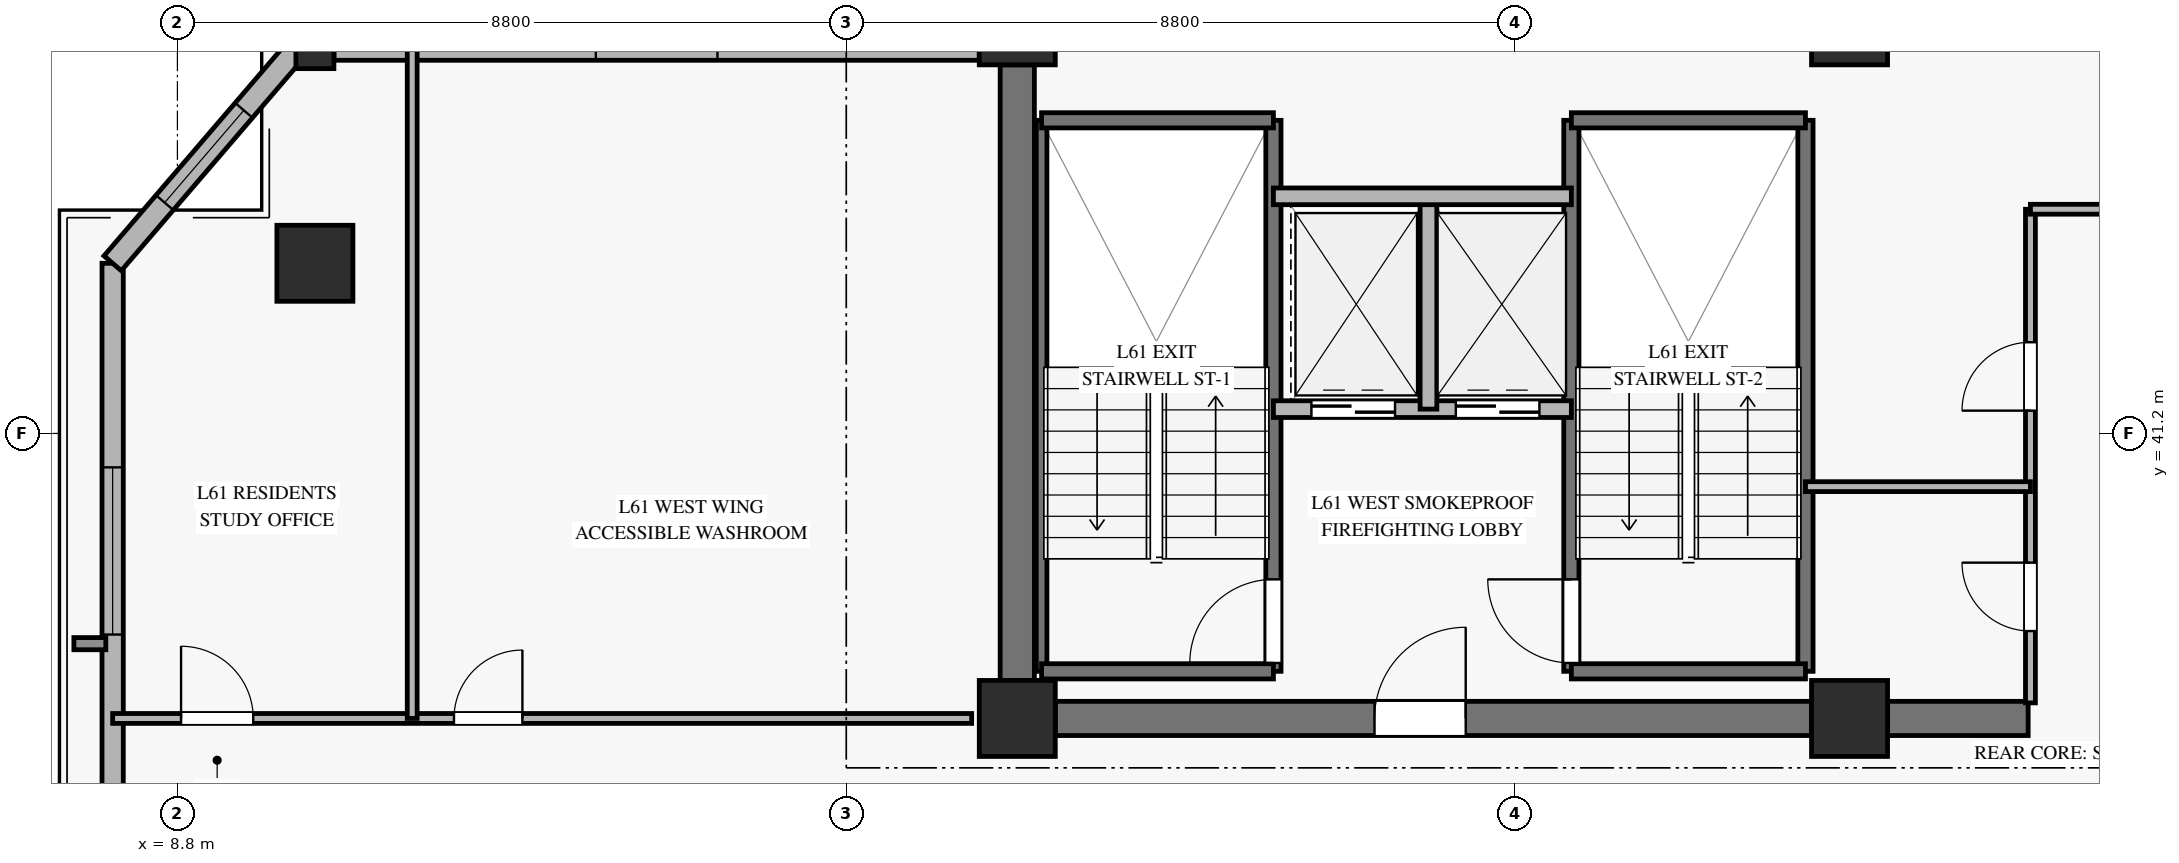
"""IFC4 building model, lengths in metres.
Left out: names, types, materials, properties, quantities, classifications, styles, units other than length and angle.
Written with IfcOpenShell. Run it as: python <this file> out.ifc"""

import sys

from ifc_helpers import new_model, si_unit, direction, frame, frame_2d, origin, origin_2d, place, context, subcontext, project, spatial, rectangle, hollow_rectangle, extrude, source, transform, mapped, element, fill, save


model = new_model("IFC4")
c1 = context("Model", 3, precision=1e-05, world=origin(), true_north=direction((0.0, 1.0)))
c2 = subcontext(c1, "Body", "Model", "MODEL_VIEW")
j1 = project(units=[si_unit("LENGTHUNIT", "METRE"), si_unit("PLANEANGLEUNIT", "RADIAN")], contexts=[c1])
p1 = place(None, origin())
s1 = spatial("IfcSite", under=j1, at=p1, CompositionType="ELEMENT")
p2 = place(p1, origin())
s2 = spatial("IfcBuilding", under=s1, at=p2, CompositionType="ELEMENT")
p3 = place(p2, frame((0.0, 0.0, 241.7)))
s3 = spatial("IfcBuildingStorey", under=s2, at=p3, CompositionType="ELEMENT", Elevation=241.7)
m1 = source(origin(), c2, "Body", "SweptSolid", [
    extrude(rectangle(XDim=1.0, YDim=1.0, at=origin_2d()), origin(), (0.0, 0.0, 1.0), 3.185),
])
for number, where, z_axis, x_axis in (
    (1, (19.85, 37.45, 0.0), (0.0, 0.0, 1.0), (1.0, 0.0, 0.0)),
    (2, (19.85, 46.55, 0.0), (0.0, 0.0, 1.0), (1.0, 0.0, 0.0)),
    (3, (30.8, 37.45, 0.0), (0.0, 0.0, 1.0), (1.0, 0.0, 0.0)),
    (4, (30.8, 46.55, 0.0), (0.0, 0.0, 1.0), (1.0, 0.0, 0.0)),
):
    element("IfcColumn", number, at=place(p3, frame(where, z_axis=z_axis, x_axis=x_axis)), inside=s3, PredefinedType="PILASTER", context=c2, shape_type="MappedRepresentation", body=[
        mapped(m1, transform((0.0, 0.0, 0.0), x_axis=(1.0, 0.0, 0.0), y_axis=(0.0, 1.0, 0.0), z_axis=(0.0, 0.0, 1.0), scale=1.0)),
    ])
p4 = place(p3, frame((20.35, 37.45, 0.0), z_axis=(0.0, 0.0, 1.0), x_axis=(1.0, 0.0, 0.0)))
e5 = element("IfcWall", 5, at=p4, inside=s3, PredefinedType="SHEAR", context=c2, shape_type="SweptSolid", body=[
    extrude(rectangle(XDim=9.95, YDim=0.45, at=frame_2d((4.975, 0.0))), origin(), (0.0, 0.0, 1.0), 3.185),
])
p5 = place(p4, frame((4.2, 0.0, 0.0)))
e6 = element("IfcOpeningElement", 6, at=p5, cuts=e5, PredefinedType="OPENING", context=c2, shape_type="SweptSolid", body=[
    extrude(rectangle(XDim=1.2, YDim=2.15, at=frame_2d((0.6, 1.075))), frame((0.0, 0.235, 0.0), z_axis=(0.0, -1.0, 0.0), x_axis=(1.0, 0.0, 0.0)), (0.0, 0.0, 1.0), 0.47),
])
p6 = place(p3, frame((31.3, 37.45, 0.0), z_axis=(0.0, 0.0, 1.0), x_axis=(1.0, 0.0, 0.0)))
e7 = element("IfcWall", 7, at=p6, inside=s3, PredefinedType="SHEAR", context=c2, shape_type="SweptSolid", body=[
    extrude(rectangle(XDim=1.85, YDim=0.45, at=frame_2d((0.925, 0.0))), origin(), (0.0, 0.0, 1.0), 3.185),
])
p7 = place(p3, frame((19.85, 37.95, 0.0), z_axis=(0.0, 0.0, 1.0), x_axis=(0.0, 1.0, 0.0)))
e8 = element("IfcWall", 8, at=p7, inside=s3, PredefinedType="SHEAR", context=c2, shape_type="SweptSolid", body=[
    extrude(rectangle(XDim=8.1, YDim=0.45, at=frame_2d((4.05, 0.0))), origin(), (0.0, 0.0, 1.0), 3.185),
])
m2 = source(origin(), c2, "Body", "SweptSolid", [
    extrude(hollow_rectangle(XDim=1.0, YDim=1.0, WallThickness=0.045, at=origin_2d()), origin(), (0.0, 0.0, 1.0), 3.185),
])
p8 = place(p3, frame((10.609, 43.439, 0.0), z_axis=(0.0, 0.0, 1.0), x_axis=(1.0, 0.0, 0.0)))
e9 = element("IfcColumn", 9, at=p8, inside=s3, PredefinedType="COLUMN", context=c2, shape_type="MappedRepresentation", body=[
    mapped(m2, transform((0.0, 0.0, 0.0), x_axis=(1.0, 0.0, 0.0), y_axis=(0.0, 1.0, 0.0), z_axis=(0.0, 0.0, 1.0), scale=1.0)),
])
m3 = source(origin(), c2, "Body", "SweptSolid", [
    extrude(hollow_rectangle(XDim=0.5, YDim=0.5, WallThickness=0.024, at=origin_2d()), origin(), (0.0, 0.0, 1.0), 3.185),
])
p9 = place(p3, frame((10.609, 46.25, 0.0), z_axis=(0.0, 0.0, 1.0), x_axis=(1.0, 0.0, 0.0)))
e10 = element("IfcColumn", 10, at=p9, inside=s3, PredefinedType="COLUMN", context=c2, shape_type="MappedRepresentation", body=[
    mapped(m3, transform((0.0, 0.0, 0.0), x_axis=(1.0, 0.0, 0.0), y_axis=(0.0, 1.0, 0.0), z_axis=(0.0, 0.0, 1.0), scale=1.0)),
])
p10 = place(p3, frame((7.948, 30.391, 0.0), z_axis=(0.0, 0.0, 1.0), x_axis=(0.0, 1.0, 0.0)))
e11 = element("IfcWall", 11, at=p10, inside=s3, PredefinedType="SOLIDWALL", context=c2, shape_type="SweptSolid", body=[
    extrude(rectangle(XDim=13.048, YDim=0.28, at=frame_2d((6.524, 0.0))), origin(), (0.0, 0.0, 1.0), 2.815),
])
p11 = place(p10, frame((8.163, 0.0, 0.45)))
e12 = element("IfcOpeningElement", 12, at=p11, cuts=e11, PredefinedType="OPENING", context=c2, shape_type="SweptSolid", body=[
    extrude(rectangle(XDim=2.2, YDim=2.1, at=frame_2d((1.1, 1.05))), frame((0.0, 0.15, 0.0), z_axis=(0.0, -1.0, 0.0), x_axis=(1.0, 0.0, 0.0)), (0.0, 0.0, 1.0), 0.3),
])
p12 = place(p3, frame((10.859, 46.25, 0.0), z_axis=(0.0, 0.0, 1.0), x_axis=(1.0, 0.0, 0.0)))
e13 = element("IfcWall", 13, at=p12, inside=s3, PredefinedType="SOLIDWALL", context=c2, shape_type="SweptSolid", body=[
    extrude(rectangle(XDim=8.491, YDim=0.28, at=frame_2d((4.246, 0.0))), origin(), (0.0, 0.0, 1.0), 2.815),
])
p13 = place(p12, frame((3.446, 0.0, 0.45)))
e14 = element("IfcOpeningElement", 14, at=p13, cuts=e13, PredefinedType="OPENING", context=c2, shape_type="SweptSolid", body=[
    extrude(rectangle(XDim=1.6, YDim=2.0, at=frame_2d((0.8, 1.0))), frame((0.0, 0.15, 0.0), z_axis=(0.0, -1.0, 0.0), x_axis=(1.0, 0.0, 0.0)), (0.0, 0.0, 1.0), 0.3),
])
p14 = place(p3, frame((10.359, 46.25, 0.0), z_axis=(0.0, 0.0, 1.0), x_axis=(-0.651013940872, -0.759065773692, 0.0)))
e15 = element("IfcWall", 15, at=p14, inside=s3, PredefinedType="SOLIDWALL", context=c2, shape_type="SweptSolid", body=[
    extrude(rectangle(XDim=3.703, YDim=0.3, at=frame_2d((1.852, 0.0))), origin(), (0.0, 0.0, 1.0), 2.815),
])
p15 = place(p14, frame((1.052, 0.0, 0.45)))
e16 = element("IfcOpeningElement", 16, at=p15, cuts=e15, PredefinedType="OPENING", context=c2, shape_type="SweptSolid", body=[
    extrude(rectangle(XDim=1.6, YDim=2.0, at=frame_2d((0.8, 1.0))), frame((0.0, 0.16, 0.0), z_axis=(0.0, -1.0, 0.0), x_axis=(1.0, 0.0, 0.0)), (0.0, 0.0, 1.0), 0.32),
])
p16 = place(p3, frame((20.17, 38.07, 0.0), z_axis=(0.0, 0.0, 1.0), x_axis=(0.0, 1.0, 0.0)))
e17 = element("IfcWall", 17, at=p16, inside=s3, PredefinedType="SOLIDWALL", context=c2, shape_type="SweptSolid", body=[
    extrude(rectangle(XDim=7.25, YDim=0.14, at=frame_2d((3.625, 0.0))), origin(), (0.0, 0.0, 1.0), 3.4),
])
p17 = place(p3, frame((23.22, 38.07, 0.0), z_axis=(0.0, 0.0, 1.0), x_axis=(0.0, 1.0, 0.0)))
e18 = element("IfcWall", 18, at=p17, inside=s3, PredefinedType="SOLIDWALL", context=c2, shape_type="SweptSolid", body=[
    extrude(rectangle(XDim=7.25, YDim=0.2, at=frame_2d((3.625, 0.0))), origin(), (0.0, 0.0, 1.0), 3.4),
])
p18 = place(p17, frame((0.11, 0.0, 0.0)))
e19 = element("IfcOpeningElement", 19, at=p18, cuts=e18, PredefinedType="OPENING", context=c2, shape_type="SweptSolid", body=[
    extrude(rectangle(XDim=1.1, YDim=2.15, at=frame_2d((0.55, 1.075))), frame((0.0, 0.11, 0.0), z_axis=(0.0, -1.0, 0.0), x_axis=(1.0, 0.0, 0.0)), (0.0, 0.0, 1.0), 0.22),
])
for number, where, z_axis, x_axis in (
    (20, (20.17, 45.32, 0.0), (0.0, 0.0, 1.0), (1.0, 0.0, 0.0)),
    (21, (20.17, 38.07, 0.0), (0.0, 0.0, 1.0), (1.0, 0.0, 0.0)),
):
    element("IfcWall", number, at=place(p3, frame(where, z_axis=z_axis, x_axis=x_axis)), inside=s3, PredefinedType="SOLIDWALL", context=c2, shape_type="SweptSolid", body=[
        extrude(rectangle(XDim=3.05, YDim=0.2, at=frame_2d((1.525, 0.0))), origin(), (0.0, 0.0, 1.0), 3.4),
    ])
p19 = place(p3, frame((27.14, 38.07, 0.0), z_axis=(0.0, 0.0, 1.0), x_axis=(0.0, 1.0, 0.0)))
e22 = element("IfcWall", 22, at=p19, inside=s3, PredefinedType="SOLIDWALL", context=c2, shape_type="SweptSolid", body=[
    extrude(rectangle(XDim=7.25, YDim=0.2, at=frame_2d((3.625, 0.0))), origin(), (0.0, 0.0, 1.0), 3.4),
])
p20 = place(p19, frame((0.11, 0.0, 0.0)))
e23 = element("IfcOpeningElement", 23, at=p20, cuts=e22, PredefinedType="OPENING", context=c2, shape_type="SweptSolid", body=[
    extrude(rectangle(XDim=1.1, YDim=2.15, at=frame_2d((0.55, 1.075))), frame((0.0, 0.11, 0.0), z_axis=(0.0, -1.0, 0.0), x_axis=(1.0, 0.0, 0.0)), (0.0, 0.0, 1.0), 0.22),
])
p21 = place(p3, frame((30.22, 38.07, 0.0), z_axis=(0.0, 0.0, 1.0), x_axis=(0.0, 1.0, 0.0)))
e24 = element("IfcWall", 24, at=p21, inside=s3, PredefinedType="SOLIDWALL", context=c2, shape_type="SweptSolid", body=[
    extrude(rectangle(XDim=7.25, YDim=0.2, at=frame_2d((3.625, 0.0))), origin(), (0.0, 0.0, 1.0), 3.4),
])
for number, where, z_axis, x_axis in (
    (25, (27.14, 45.32, 0.0), (0.0, 0.0, 1.0), (1.0, 0.0, 0.0)),
    (26, (27.14, 38.07, 0.0), (0.0, 0.0, 1.0), (1.0, 0.0, 0.0)),
):
    element("IfcWall", number, at=place(p3, frame(where, z_axis=z_axis, x_axis=x_axis)), inside=s3, PredefinedType="SOLIDWALL", context=c2, shape_type="SweptSolid", body=[
        extrude(rectangle(XDim=3.08, YDim=0.2, at=frame_2d((1.54, 0.0))), origin(), (0.0, 0.0, 1.0), 3.4),
    ])
p22 = place(p3, frame((23.22, 41.52, 0.0), z_axis=(0.0, 0.0, 1.0), x_axis=(1.0, 0.0, 0.0)))
e27 = element("IfcWall", 27, at=p22, inside=s3, PredefinedType="SOLIDWALL", context=c2, shape_type="SweptSolid", body=[
    extrude(rectangle(XDim=3.92, YDim=0.22, at=frame_2d((1.96, 0.0))), origin(), (0.0, 0.0, 1.0), 3.185),
])
p23 = place(p22, frame((0.5, 0.0, 0.0)))
e28 = element("IfcOpeningElement", 28, at=p23, cuts=e27, PredefinedType="OPENING", context=c2, shape_type="SweptSolid", body=[
    extrude(rectangle(XDim=1.1, YDim=2.2, at=frame_2d((0.55, 1.1))), frame((0.0, 0.12, 0.0), z_axis=(0.0, -1.0, 0.0), x_axis=(1.0, 0.0, 0.0)), (0.0, 0.0, 1.0), 0.24),
])
p24 = place(p22, frame((2.4, 0.0, 0.0)))
e29 = element("IfcOpeningElement", 29, at=p24, cuts=e27, PredefinedType="OPENING", context=c2, shape_type="SweptSolid", body=[
    extrude(rectangle(XDim=1.1, YDim=2.2, at=frame_2d((0.55, 1.1))), frame((0.0, 0.12, 0.0), z_axis=(0.0, -1.0, 0.0), x_axis=(1.0, 0.0, 0.0)), (0.0, 0.0, 1.0), 0.24),
])
p25 = place(p3, frame((25.26, 41.52, 0.0), z_axis=(0.0, 0.0, 1.0), x_axis=(0.0, 1.0, 0.0)))
e30 = element("IfcWall", 30, at=p25, inside=s3, PredefinedType="SOLIDWALL", context=c2, shape_type="SweptSolid", body=[
    extrude(rectangle(XDim=2.8, YDim=0.22, at=frame_2d((1.4, 0.0))), origin(), (0.0, 0.0, 1.0), 3.185),
])
p26 = place(p3, frame((23.22, 44.32, 0.0), z_axis=(0.0, 0.0, 1.0), x_axis=(1.0, 0.0, 0.0)))
e31 = element("IfcWall", 31, at=p26, inside=s3, PredefinedType="SOLIDWALL", context=c2, shape_type="SweptSolid", body=[
    extrude(rectangle(XDim=3.92, YDim=0.22, at=frame_2d((1.96, 0.0))), origin(), (0.0, 0.0, 1.0), 3.185),
])
p27 = place(p3, frame((33.18, 37.655, 0.0), z_axis=(0.0, 0.0, 1.0), x_axis=(0.0, 1.0, 0.0)))
e32 = element("IfcWall", 32, at=p27, inside=s3, PredefinedType="PARTITIONING", context=c2, shape_type="SweptSolid", body=[
    extrude(rectangle(XDim=6.495, YDim=0.13, at=frame_2d((3.248, 0.0))), origin(), (0.0, 0.0, 1.0), 2.27),
])
p28 = place(p27, frame((0.945, 0.0, 0.0)))
e33 = element("IfcOpeningElement", 33, at=p28, cuts=e32, PredefinedType="OPENING", context=c2, shape_type="SweptSolid", body=[
    extrude(rectangle(XDim=0.9, YDim=2.1, at=frame_2d((0.45, 1.05))), frame((0.0, 0.075, 0.0), z_axis=(0.0, -1.0, 0.0), x_axis=(1.0, 0.0, 0.0)), (0.0, 0.0, 1.0), 0.15),
])
p29 = place(p27, frame((3.845, 0.0, 0.0)))
e34 = element("IfcOpeningElement", 34, at=p29, cuts=e32, PredefinedType="OPENING", context=c2, shape_type="SweptSolid", body=[
    extrude(rectangle(XDim=0.9, YDim=2.1, at=frame_2d((0.45, 1.05))), frame((0.0, 0.075, 0.0), z_axis=(0.0, -1.0, 0.0), x_axis=(1.0, 0.0, 0.0)), (0.0, 0.0, 1.0), 0.15),
])
p30 = place(p3, frame((33.18, 44.15, 0.0), z_axis=(0.0, 0.0, 1.0), x_axis=(1.0, 0.0, 0.0)))
e35 = element("IfcWall", 35, at=p30, inside=s3, PredefinedType="PARTITIONING", context=c2, shape_type="SweptSolid", body=[
    extrude(rectangle(XDim=2.94, YDim=0.13, at=frame_2d((1.47, 0.0))), origin(), (0.0, 0.0, 1.0), 2.47),
])
p31 = place(p3, frame((30.22, 40.5, 0.0), z_axis=(0.0, 0.0, 1.0), x_axis=(1.0, 0.0, 0.0)))
e36 = element("IfcWall", 36, at=p31, inside=s3, PredefinedType="PARTITIONING", context=c2, shape_type="SweptSolid", body=[
    extrude(rectangle(XDim=2.96, YDim=0.13, at=frame_2d((1.48, 0.0))), origin(), (0.0, 0.0, 1.0), 2.47),
])
p32 = place(p3, frame((7.948, 37.45, 0.0), z_axis=(0.0, 0.0, 1.0), x_axis=(1.0, 0.0, 0.0)))
e37 = element("IfcWall", 37, at=p32, inside=s3, PredefinedType="PARTITIONING", context=c2, shape_type="SweptSolid", body=[
    extrude(rectangle(XDim=11.302, YDim=0.13, at=frame_2d((5.651, 0.0))), origin(), (0.0, 0.0, 1.0), 2.82),
])
p33 = place(p32, frame((0.9, 0.0, 0.0)))
e38 = element("IfcOpeningElement", 38, at=p33, cuts=e37, PredefinedType="OPENING", context=c2, shape_type="SweptSolid", body=[
    extrude(rectangle(XDim=0.95, YDim=2.1, at=frame_2d((0.475, 1.05))), frame((0.0, 0.075, 0.0), z_axis=(0.0, -1.0, 0.0), x_axis=(1.0, 0.0, 0.0)), (0.0, 0.0, 1.0), 0.15),
])
p34 = place(p32, frame((4.491, 0.0, 0.0)))
e39 = element("IfcOpeningElement", 39, at=p34, cuts=e37, PredefinedType="OPENING", context=c2, shape_type="SweptSolid", body=[
    extrude(rectangle(XDim=0.9, YDim=2.1, at=frame_2d((0.45, 1.05))), frame((0.0, 0.075, 0.0), z_axis=(0.0, -1.0, 0.0), x_axis=(1.0, 0.0, 0.0)), (0.0, 0.0, 1.0), 0.15),
])
p35 = place(p3, frame((11.889, 37.45, 0.0), z_axis=(0.0, 0.0, 1.0), x_axis=(0.0, 1.0, 0.0)))
e40 = element("IfcWall", 40, at=p35, inside=s3, PredefinedType="PARTITIONING", context=c2, shape_type="SweptSolid", body=[
    extrude(rectangle(XDim=8.8, YDim=0.13, at=frame_2d((4.4, 0.0))), origin(), (0.0, 0.0, 1.0), 3.185),
])
m4 = source(origin(), c2, "Body", "SweptSolid", [
    extrude(rectangle(XDim=2.2, YDim=2.1, at=frame_2d((1.1, 1.05))), frame((0.0, 0.03, 0.0), z_axis=(0.0, -1.0, 0.0), x_axis=(1.0, 0.0, 0.0)), (0.0, 0.0, 1.0), 0.06),
])
p36 = place(p11, origin())
e41 = element("IfcWindow", 41, at=p36, inside=s3, PartitioningType="SINGLE_PANEL", PredefinedType="WINDOW", context=c2, shape_type="MappedRepresentation", body=[
    mapped(m4, transform((0.0, 0.0, 0.0), x_axis=(1.0, 0.0, 0.0), y_axis=(0.0, 1.0, 0.0), z_axis=(0.0, 0.0, 1.0), scale=1.0)),
])
fill(e12, e41)
m5 = source(origin(), c2, "Body", "SweptSolid", [
    extrude(rectangle(XDim=1.6, YDim=2.0, at=frame_2d((0.8, 1.0))), frame((0.0, 0.03, 0.0), z_axis=(0.0, -1.0, 0.0), x_axis=(1.0, 0.0, 0.0)), (0.0, 0.0, 1.0), 0.06),
])
p37 = place(p15, origin())
e42 = element("IfcWindow", 42, at=p37, inside=s3, PartitioningType="SINGLE_PANEL", PredefinedType="WINDOW", context=c2, shape_type="MappedRepresentation", body=[
    mapped(m5, transform((0.0, 0.0, 0.0), x_axis=(1.0, 0.0, 0.0), y_axis=(0.0, 1.0, 0.0), z_axis=(0.0, 0.0, 1.0), scale=1.0)),
])
fill(e16, e42)
m6 = source(origin(), c2, "Body", "SweptSolid", [
    extrude(rectangle(XDim=1.1, YDim=2.15, at=frame_2d((0.55, 1.075))), frame((0.0, 0.025, 0.0), z_axis=(0.0, -1.0, 0.0), x_axis=(1.0, 0.0, 0.0)), (0.0, 0.0, 1.0), 0.05),
])
p38 = place(p18, origin())
e43 = element("IfcDoor", 43, at=p38, inside=s3, OperationType="SINGLE_SWING_LEFT", PredefinedType="DOOR", context=c2, shape_type="MappedRepresentation", body=[
    mapped(m6, transform((0.0, 0.0, 0.0), x_axis=(1.0, 0.0, 0.0), y_axis=(0.0, 1.0, 0.0), z_axis=(0.0, 0.0, 1.0), scale=1.0)),
])
fill(e19, e43)
p39 = place(p20, origin())
e44 = element("IfcDoor", 44, at=p39, inside=s3, OperationType="SINGLE_SWING_RIGHT", PredefinedType="DOOR", context=c2, shape_type="MappedRepresentation", body=[
    mapped(m6, transform((0.0, 0.0, 0.0), x_axis=(1.0, 0.0, 0.0), y_axis=(0.0, 1.0, 0.0), z_axis=(0.0, 0.0, 1.0), scale=1.0)),
])
fill(e23, e44)
m7 = source(origin(), c2, "Body", "SweptSolid", [
    extrude(rectangle(XDim=1.1, YDim=2.2, at=frame_2d((0.55, 1.1))), frame((0.0, 0.025, 0.0), z_axis=(0.0, -1.0, 0.0), x_axis=(1.0, 0.0, 0.0)), (0.0, 0.0, 1.0), 0.05),
])
p40 = place(p23, origin())
e45 = element("IfcDoor", 45, at=p40, inside=s3, OperationType="SLIDING_TO_LEFT", PredefinedType="DOOR", context=c2, shape_type="MappedRepresentation", body=[
    mapped(m7, transform((0.0, 0.0, 0.0), x_axis=(1.0, 0.0, 0.0), y_axis=(0.0, 1.0, 0.0), z_axis=(0.0, 0.0, 1.0), scale=1.0)),
])
fill(e28, e45)
p41 = place(p24, origin())
e46 = element("IfcDoor", 46, at=p41, inside=s3, OperationType="SLIDING_TO_LEFT", PredefinedType="DOOR", context=c2, shape_type="MappedRepresentation", body=[
    mapped(m7, transform((0.0, 0.0, 0.0), x_axis=(1.0, 0.0, 0.0), y_axis=(0.0, 1.0, 0.0), z_axis=(0.0, 0.0, 1.0), scale=1.0)),
])
fill(e29, e46)
m8 = source(origin(), c2, "Body", "SweptSolid", [
    extrude(rectangle(XDim=1.2, YDim=2.15, at=frame_2d((0.6, 1.075))), frame((0.0, 0.025, 0.0), z_axis=(0.0, -1.0, 0.0), x_axis=(1.0, 0.0, 0.0)), (0.0, 0.0, 1.0), 0.05),
])
p42 = place(p5, origin())
e47 = element("IfcDoor", 47, at=p42, inside=s3, OperationType="SINGLE_SWING_RIGHT", PredefinedType="DOOR", context=c2, shape_type="MappedRepresentation", body=[
    mapped(m8, transform((0.0, 0.0, 0.0), x_axis=(1.0, 0.0, 0.0), y_axis=(0.0, 1.0, 0.0), z_axis=(0.0, 0.0, 1.0), scale=1.0)),
])
fill(e6, e47)
m9 = source(origin(), c2, "Body", "SweptSolid", [
    extrude(rectangle(XDim=0.9, YDim=2.1, at=frame_2d((0.45, 1.05))), frame((0.0, 0.025, 0.0), z_axis=(0.0, -1.0, 0.0), x_axis=(1.0, 0.0, 0.0)), (0.0, 0.0, 1.0), 0.05),
])
p43 = place(p28, origin())
e48 = element("IfcDoor", 48, at=p43, inside=s3, OperationType="SINGLE_SWING_RIGHT", PredefinedType="DOOR", context=c2, shape_type="MappedRepresentation", body=[
    mapped(m9, transform((0.0, 0.0, 0.0), x_axis=(1.0, 0.0, 0.0), y_axis=(0.0, 1.0, 0.0), z_axis=(0.0, 0.0, 1.0), scale=1.0)),
])
fill(e33, e48)
p44 = place(p29, origin())
e49 = element("IfcDoor", 49, at=p44, inside=s3, OperationType="SINGLE_SWING_LEFT", PredefinedType="DOOR", context=c2, shape_type="MappedRepresentation", body=[
    mapped(m9, transform((0.0, 0.0, 0.0), x_axis=(1.0, 0.0, 0.0), y_axis=(0.0, 1.0, 0.0), z_axis=(0.0, 0.0, 1.0), scale=1.0)),
])
fill(e34, e49)
m10 = source(origin(), c2, "Body", "SweptSolid", [
    extrude(rectangle(XDim=0.95, YDim=2.1, at=frame_2d((0.475, 1.05))), frame((0.0, 0.025, 0.0), z_axis=(0.0, -1.0, 0.0), x_axis=(1.0, 0.0, 0.0)), (0.0, 0.0, 1.0), 0.05),
])
p45 = place(p33, origin())
e50 = element("IfcDoor", 50, at=p45, inside=s3, OperationType="SINGLE_SWING_LEFT", PredefinedType="DOOR", context=c2, shape_type="MappedRepresentation", body=[
    mapped(m10, transform((0.0, 0.0, 0.0), x_axis=(1.0, 0.0, 0.0), y_axis=(0.0, 1.0, 0.0), z_axis=(0.0, 0.0, 1.0), scale=1.0)),
])
fill(e38, e50)
p46 = place(p34, origin())
e51 = element("IfcDoor", 51, at=p46, inside=s3, OperationType="SINGLE_SWING_RIGHT", PredefinedType="DOOR", context=c2, shape_type="MappedRepresentation", body=[
    mapped(m9, transform((0.0, 0.0, 0.0), x_axis=(1.0, 0.0, 0.0), y_axis=(0.0, 1.0, 0.0), z_axis=(0.0, 0.0, 1.0), scale=1.0)),
])
fill(e39, e51)
save(model, sys.argv[1])
